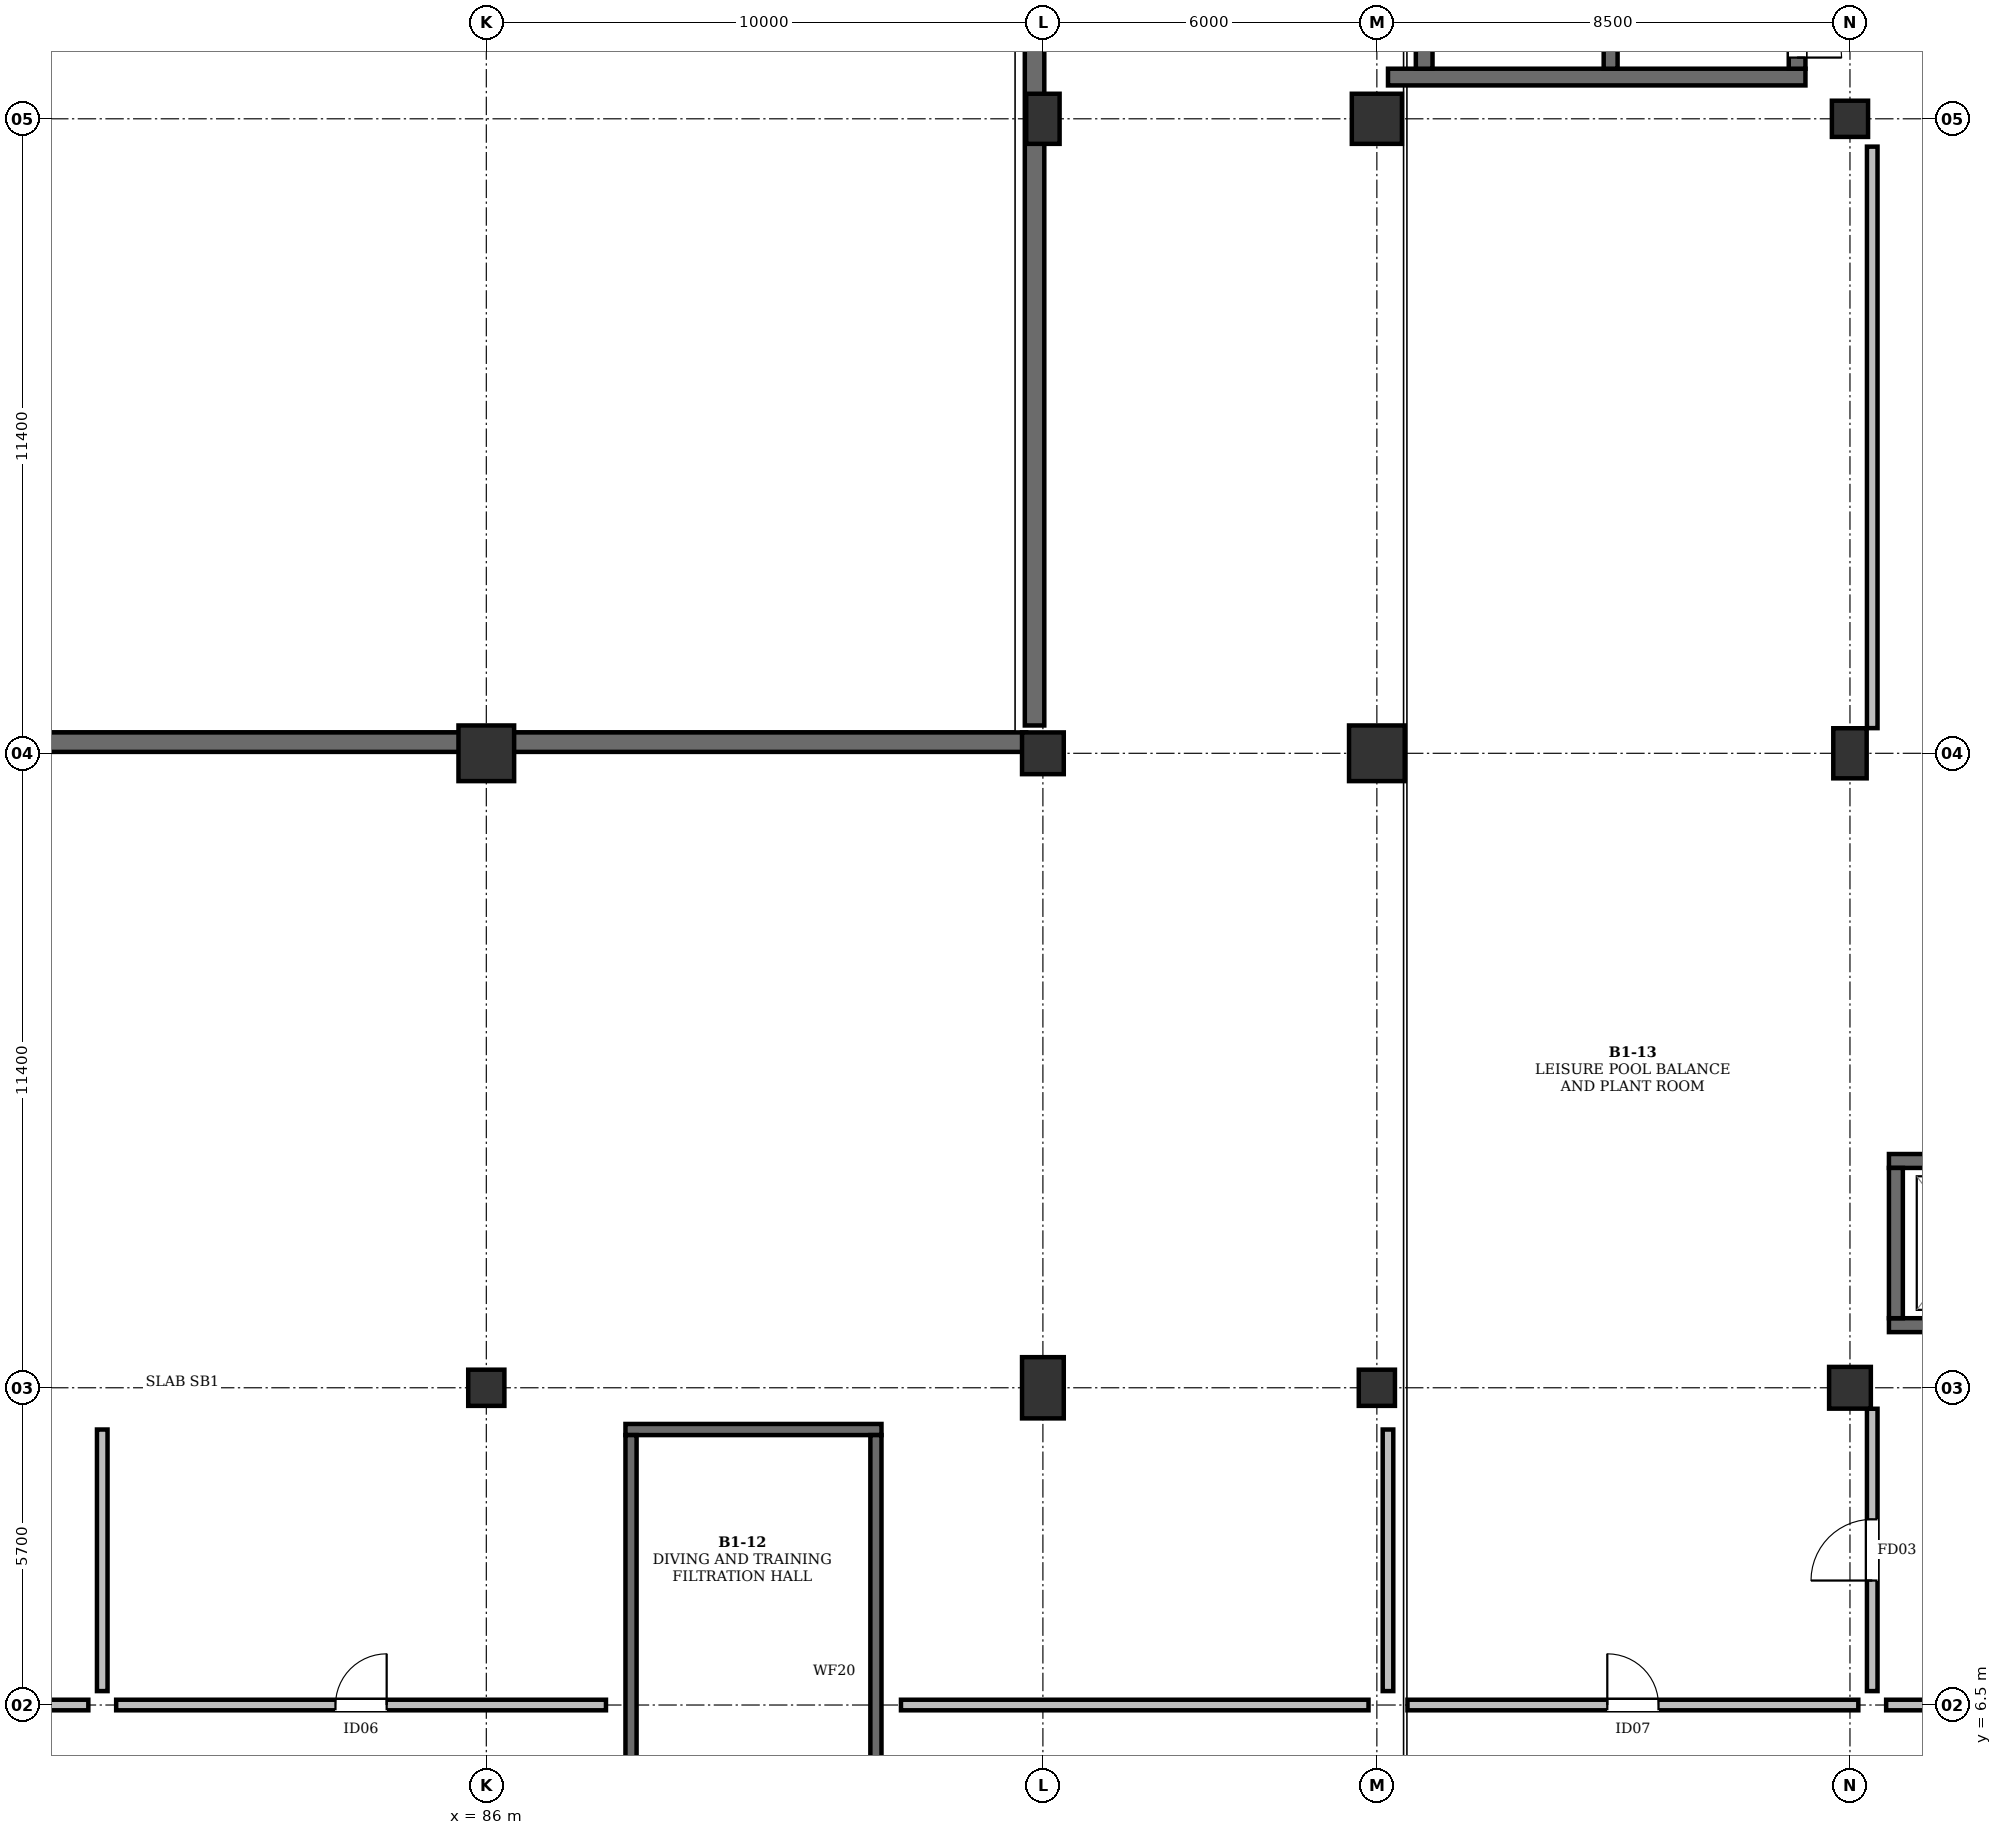
"""IFC4 building model, lengths in metres.
Left out: names, types, materials, properties, quantities, classifications, styles, units other than length and angle.
Written with IfcOpenShell. Run it as: python <this file> out.ifc"""

import sys

from ifc_helpers import new_model, si_unit, direction, frame, frame_2d, origin, origin_2d, place, context, subcontext, project, spatial, rectangle, extrude, element, fill, save


model = new_model("IFC4")
c1 = context("Model", 3, precision=1e-05, world=origin(), true_north=direction((0.0, 1.0)))
c2 = subcontext(c1, "Body", "Model", "MODEL_VIEW")
j1 = project(units=[si_unit("LENGTHUNIT", "METRE"), si_unit("PLANEANGLEUNIT", "RADIAN")], contexts=[c1])
p1 = place(None, origin())
s1 = spatial("IfcSite", under=j1, at=p1, CompositionType="ELEMENT")
p2 = place(p1, origin())
s2 = spatial("IfcBuilding", under=s1, at=p2, CompositionType="ELEMENT")
p3 = place(p2, frame((0.0, 0.0, -4.8)))
s3 = spatial("IfcBuildingStorey", under=s2, at=p3, CompositionType="ELEMENT", Elevation=-4.8)
p4 = place(p3, frame((86.0, 12.2, 0.0), z_axis=(0.0, 0.0, 1.0), x_axis=(1.0, 0.0, 0.0)))
e1 = element("IfcColumn", 1, at=p4, inside=s3, PredefinedType="COLUMN", context=c2, shape_type="SweptSolid", body=[
    extrude(rectangle(XDim=0.65, YDim=0.65, at=origin_2d()), origin(), (0.0, 0.0, 1.0), 4.8),
])
p5 = place(p3, frame((86.0, 23.6, 0.0), z_axis=(0.0, 0.0, 1.0), x_axis=(1.0, 0.0, 0.0)))
e2 = element("IfcColumn", 2, at=p5, inside=s3, PredefinedType="COLUMN", context=c2, shape_type="SweptSolid", body=[
    extrude(rectangle(XDim=1.0, YDim=1.0, at=origin_2d()), origin(), (0.0, 0.0, 1.0), 4.8),
])
p6 = place(p3, frame((96.0, 12.2, 0.0), z_axis=(0.0, 0.0, 1.0), x_axis=(1.0, 0.0, 0.0)))
e3 = element("IfcColumn", 3, at=p6, inside=s3, PredefinedType="COLUMN", context=c2, shape_type="SweptSolid", body=[
    extrude(rectangle(XDim=0.75, YDim=1.1, at=origin_2d()), origin(), (0.0, 0.0, 1.0), 4.8),
])
p7 = place(p3, frame((96.0, 23.6, 0.0), z_axis=(0.0, 0.0, 1.0), x_axis=(1.0, 0.0, 0.0)))
e4 = element("IfcColumn", 4, at=p7, inside=s3, PredefinedType="COLUMN", context=c2, shape_type="SweptSolid", body=[
    extrude(rectangle(XDim=0.75, YDim=0.75, at=origin_2d()), origin(), (0.0, 0.0, 1.0), 4.8),
])
p8 = place(p3, frame((96.0, 35.0, 0.0), z_axis=(0.0, 0.0, 1.0), x_axis=(1.0, 0.0, 0.0)))
e5 = element("IfcColumn", 5, at=p8, inside=s3, PredefinedType="COLUMN", context=c2, shape_type="SweptSolid", body=[
    extrude(rectangle(XDim=0.6, YDim=0.9, at=origin_2d()), origin(), (0.0, 0.0, 1.0), 4.8),
])
p9 = place(p3, frame((102.0, 12.2, 0.0), z_axis=(0.0, 0.0, 1.0), x_axis=(1.0, 0.0, 0.0)))
e6 = element("IfcColumn", 6, at=p9, inside=s3, PredefinedType="COLUMN", context=c2, shape_type="SweptSolid", body=[
    extrude(rectangle(XDim=0.65, YDim=0.65, at=origin_2d()), origin(), (0.0, 0.0, 1.0), 4.8),
])
p10 = place(p3, frame((102.0, 23.6, 0.0), z_axis=(0.0, 0.0, 1.0), x_axis=(1.0, 0.0, 0.0)))
e7 = element("IfcColumn", 7, at=p10, inside=s3, PredefinedType="COLUMN", context=c2, shape_type="SweptSolid", body=[
    extrude(rectangle(XDim=1.0, YDim=1.0, at=origin_2d()), origin(), (0.0, 0.0, 1.0), 4.8),
])
p11 = place(p3, frame((102.0, 35.0, 0.0), z_axis=(0.0, 0.0, 1.0), x_axis=(1.0, 0.0, 0.0)))
e8 = element("IfcColumn", 8, at=p11, inside=s3, PredefinedType="COLUMN", context=c2, shape_type="SweptSolid", body=[
    extrude(rectangle(XDim=0.9, YDim=0.9, at=origin_2d()), origin(), (0.0, 0.0, 1.0), 4.8),
])
p12 = place(p3, frame((110.5, 12.2, 0.0), z_axis=(0.0, 0.0, 1.0), x_axis=(1.0, 0.0, 0.0)))
e9 = element("IfcColumn", 9, at=p12, inside=s3, PredefinedType="COLUMN", context=c2, shape_type="SweptSolid", body=[
    extrude(rectangle(XDim=0.75, YDim=0.75, at=origin_2d()), origin(), (0.0, 0.0, 1.0), 4.8),
])
p13 = place(p3, frame((110.5, 23.6, 0.0), z_axis=(0.0, 0.0, 1.0), x_axis=(1.0, 0.0, 0.0)))
e10 = element("IfcColumn", 10, at=p13, inside=s3, PredefinedType="COLUMN", context=c2, shape_type="SweptSolid", body=[
    extrude(rectangle(XDim=0.6, YDim=0.9, at=origin_2d()), origin(), (0.0, 0.0, 1.0), 4.8),
])
p14 = place(p3, frame((110.5, 35.0, 0.0), z_axis=(0.0, 0.0, 1.0), x_axis=(1.0, 0.0, 0.0)))
e11 = element("IfcColumn", 11, at=p14, inside=s3, PredefinedType="COLUMN", context=c2, shape_type="SweptSolid", body=[
    extrude(rectangle(XDim=0.65, YDim=0.65, at=origin_2d()), origin(), (0.0, 0.0, 1.0), 4.8),
])
p15 = place(p3, frame((46.3, 23.8, 0.0), z_axis=(0.0, 0.0, 1.0), x_axis=(1.0, 0.0, 0.0)))
e12 = element("IfcWall", 12, at=p15, inside=s3, PredefinedType="SHEAR", context=c2, shape_type="SweptSolid", body=[
    extrude(rectangle(XDim=49.4, YDim=0.35, at=frame_2d((24.7, 0.0))), origin(), (0.0, 0.0, 1.0), 4.52),
])
p16 = place(p3, frame((95.85, 24.1, 0.0), z_axis=(0.0, 0.0, 1.0), x_axis=(0.0, 1.0, 0.0)))
e13 = element("IfcWall", 13, at=p16, inside=s3, PredefinedType="SHEAR", context=c2, shape_type="SweptSolid", body=[
    extrude(rectangle(XDim=67.7, YDim=0.35, at=frame_2d((33.85, 0.0))), origin(), (0.0, 0.0, 1.0), 4.52),
])
p17 = place(p3, frame((102.2, 35.75, 0.0), z_axis=(0.0, 0.0, 1.0), x_axis=(1.0, 0.0, 0.0)))
e14 = element("IfcWall", 14, at=p17, inside=s3, PredefinedType="SHEAR", context=c2, shape_type="SweptSolid", body=[
    extrude(rectangle(XDim=7.5, YDim=0.3, at=frame_2d((3.75, 0.0))), origin(), (0.0, 0.0, 1.0), 4.52),
])
p18 = place(p3, frame((102.85, 35.9, 0.0), z_axis=(0.0, 0.0, 1.0), x_axis=(0.0, 1.0, 0.0)))
e15 = element("IfcWall", 15, at=p18, inside=s3, PredefinedType="SHEAR", context=c2, shape_type="SweptSolid", body=[
    extrude(rectangle(XDim=9.6, YDim=0.3, at=frame_2d((4.8, 0.0))), origin(), (0.0, 0.0, 1.0), 4.52),
])
p19 = place(p18, frame((3.6, 0.0, 0.0)))
e16 = element("IfcOpeningElement", 16, at=p19, cuts=e15, PredefinedType="OPENING", context=c2, shape_type="SweptSolid", body=[
    extrude(rectangle(XDim=1.1, YDim=2.2, at=frame_2d((0.55, 1.1))), frame((0.0, 0.162, 0.0), z_axis=(0.0, -1.0, 0.0), x_axis=(1.0, 0.0, 0.0)), (0.0, 0.0, 1.0), 0.324),
])
p20 = place(p3, frame((109.55, 35.9, 0.0), z_axis=(0.0, 0.0, 1.0), x_axis=(0.0, 1.0, 0.0)))
e17 = element("IfcWall", 17, at=p20, inside=s3, PredefinedType="SHEAR", context=c2, shape_type="SweptSolid", body=[
    extrude(rectangle(XDim=9.6, YDim=0.3, at=frame_2d((4.8, 0.0))), origin(), (0.0, 0.0, 1.0), 4.52),
])
p21 = place(p20, frame((0.2, 0.0, 0.0)))
e18 = element("IfcOpeningElement", 18, at=p21, cuts=e17, PredefinedType="OPENING", context=c2, shape_type="SweptSolid", body=[
    extrude(rectangle(XDim=1.6, YDim=2.2, at=frame_2d((0.8, 1.1))), frame((0.0, 0.162, 0.0), z_axis=(0.0, -1.0, 0.0), x_axis=(1.0, 0.0, 0.0)), (0.0, 0.0, 1.0), 0.324),
])
p22 = place(p3, frame((106.2, 35.9, 0.0), z_axis=(0.0, 0.0, 1.0), x_axis=(0.0, 1.0, 0.0)))
e19 = element("IfcWall", 19, at=p22, inside=s3, PredefinedType="SHEAR", context=c2, shape_type="SweptSolid", body=[
    extrude(rectangle(XDim=9.6, YDim=0.25, at=frame_2d((4.8, 0.0))), origin(), (0.0, 0.0, 1.0), 4.52),
])
for number, where, z_axis, x_axis in (
    (20, (111.2, 13.325, 0.0), (0.0, 0.0, 1.0), (1.0, 0.0, 0.0)),
    (21, (111.2, 16.275, 0.0), (0.0, 0.0, 1.0), (1.0, 0.0, 0.0)),
):
    element("IfcWall", number, at=place(p3, frame(where, z_axis=z_axis, x_axis=x_axis)), inside=s3, PredefinedType="SHEAR", context=c2, shape_type="SweptSolid", body=[
        extrude(rectangle(XDim=2.8, YDim=0.25, at=frame_2d((1.4, 0.0))), origin(), (0.0, 0.0, 1.0), 4.52),
    ])
p23 = place(p3, frame((111.325, 13.45, 0.0), z_axis=(0.0, 0.0, 1.0), x_axis=(0.0, 1.0, 0.0)))
e22 = element("IfcWall", 22, at=p23, inside=s3, PredefinedType="SHEAR", context=c2, shape_type="SweptSolid", body=[
    extrude(rectangle(XDim=2.7, YDim=0.25, at=frame_2d((1.35, 0.0))), origin(), (0.0, 0.0, 1.0), 4.52),
])
p24 = place(p3, frame((88.5, 11.45, 0.0), z_axis=(0.0, 0.0, 1.0), x_axis=(1.0, 0.0, 0.0)))
e23 = element("IfcWall", 23, at=p24, inside=s3, PredefinedType="SOLIDWALL", context=c2, shape_type="SweptSolid", body=[
    extrude(rectangle(XDim=4.6, YDim=0.2, at=frame_2d((2.3, 0.0))), origin(), (0.0, 0.0, 1.0), 4.52),
])
for number, where, z_axis, x_axis in (
    (24, (88.6, 2.85, 0.0), (0.0, 0.0, 1.0), (0.0, 1.0, 0.0)),
    (25, (93.0, 2.85, 0.0), (0.0, 0.0, 1.0), (0.0, 1.0, 0.0)),
):
    element("IfcWall", number, at=place(p3, frame(where, z_axis=z_axis, x_axis=x_axis)), inside=s3, PredefinedType="SOLIDWALL", context=c2, shape_type="SweptSolid", body=[
        extrude(rectangle(XDim=8.5, YDim=0.2, at=frame_2d((4.25, 0.0))), origin(), (0.0, 0.0, 1.0), 4.52),
    ])
p25 = place(p3, frame((55.35, 6.5, 0.0), z_axis=(0.0, 0.0, 1.0), x_axis=(1.0, 0.0, 0.0)))
e26 = element("IfcWall", 26, at=p25, inside=s3, PredefinedType="SOLIDWALL", context=c2, shape_type="SweptSolid", body=[
    extrude(rectangle(XDim=23.5, YDim=0.19, at=frame_2d((11.75, 0.0))), origin(), (0.0, 0.0, 1.0), 3.605),
])
p26 = place(p25, frame((11.275, 0.0, 0.0)))
e27 = element("IfcOpeningElement", 27, at=p26, cuts=e26, PredefinedType="OPENING", context=c2, shape_type="SweptSolid", body=[
    extrude(rectangle(XDim=0.95, YDim=2.15, at=frame_2d((0.475, 1.075))), frame((0.0, 0.107, 0.0), z_axis=(0.0, -1.0, 0.0), x_axis=(1.0, 0.0, 0.0)), (0.0, 0.0, 1.0), 0.214),
])
p27 = place(p3, frame((79.35, 6.5, 0.0), z_axis=(0.0, 0.0, 1.0), x_axis=(1.0, 0.0, 0.0)))
e28 = element("IfcWall", 28, at=p27, inside=s3, PredefinedType="SOLIDWALL", context=c2, shape_type="SweptSolid", body=[
    extrude(rectangle(XDim=8.8, YDim=0.19, at=frame_2d((4.4, 0.0))), origin(), (0.0, 0.0, 1.0), 3.605),
])
p28 = place(p27, frame((3.94, 0.0, 0.0)))
e29 = element("IfcOpeningElement", 29, at=p28, cuts=e28, PredefinedType="OPENING", context=c2, shape_type="SweptSolid", body=[
    extrude(rectangle(XDim=0.92, YDim=2.1, at=frame_2d((0.46, 1.05))), frame((0.0, 0.107, 0.0), z_axis=(0.0, -1.0, 0.0), x_axis=(1.0, 0.0, 0.0)), (0.0, 0.0, 1.0), 0.214),
])
p29 = place(p3, frame((93.45, 6.5, 0.0), z_axis=(0.0, 0.0, 1.0), x_axis=(1.0, 0.0, 0.0)))
e30 = element("IfcWall", 30, at=p29, inside=s3, PredefinedType="SOLIDWALL", context=c2, shape_type="SweptSolid", body=[
    extrude(rectangle(XDim=8.4, YDim=0.19, at=frame_2d((4.2, 0.0))), origin(), (0.0, 0.0, 1.0), 3.605),
])
p30 = place(p3, frame((102.55, 6.5, 0.0), z_axis=(0.0, 0.0, 1.0), x_axis=(1.0, 0.0, 0.0)))
e31 = element("IfcWall", 31, at=p30, inside=s3, PredefinedType="SOLIDWALL", context=c2, shape_type="SweptSolid", body=[
    extrude(rectangle(XDim=8.1, YDim=0.19, at=frame_2d((4.05, 0.0))), origin(), (0.0, 0.0, 1.0), 3.605),
])
p31 = place(p30, frame((3.59, 0.0, 0.0)))
e32 = element("IfcOpeningElement", 32, at=p31, cuts=e31, PredefinedType="OPENING", context=c2, shape_type="SweptSolid", body=[
    extrude(rectangle(XDim=0.92, YDim=2.15, at=frame_2d((0.46, 1.075))), frame((0.0, 0.107, 0.0), z_axis=(0.0, -1.0, 0.0), x_axis=(1.0, 0.0, 0.0)), (0.0, 0.0, 1.0), 0.214),
])
p32 = place(p3, frame((111.15, 6.5, 0.0), z_axis=(0.0, 0.0, 1.0), x_axis=(1.0, 0.0, 0.0)))
e33 = element("IfcWall", 33, at=p32, inside=s3, PredefinedType="SOLIDWALL", context=c2, shape_type="SweptSolid", body=[
    extrude(rectangle(XDim=7.5, YDim=0.19, at=frame_2d((3.75, 0.0))), origin(), (0.0, 0.0, 1.0), 3.605),
])
p33 = place(p32, frame((3.05, 0.0, 0.0)))
e34 = element("IfcOpeningElement", 34, at=p33, cuts=e33, PredefinedType="OPENING", context=c2, shape_type="SweptSolid", body=[
    extrude(rectangle(XDim=1.4, YDim=2.2, at=frame_2d((0.7, 1.1))), frame((0.0, 0.107, 0.0), z_axis=(0.0, -1.0, 0.0), x_axis=(1.0, 0.0, 0.0)), (0.0, 0.0, 1.0), 0.214),
])
p34 = place(p3, frame((79.1, 6.75, 0.0), z_axis=(0.0, 0.0, 1.0), x_axis=(0.0, 1.0, 0.0)))
e35 = element("IfcWall", 35, at=p34, inside=s3, PredefinedType="SOLIDWALL", context=c2, shape_type="SweptSolid", body=[
    extrude(rectangle(XDim=4.7, YDim=0.19, at=frame_2d((2.35, 0.0))), origin(), (0.0, 0.0, 1.0), 4.099),
])
p35 = place(p3, frame((102.2, 6.75, 0.0), z_axis=(0.0, 0.0, 1.0), x_axis=(0.0, 1.0, 0.0)))
e36 = element("IfcWall", 36, at=p35, inside=s3, PredefinedType="SOLIDWALL", context=c2, shape_type="SweptSolid", body=[
    extrude(rectangle(XDim=4.7, YDim=0.19, at=frame_2d((2.35, 0.0))), origin(), (0.0, 0.0, 1.0), 3.605),
])
p36 = place(p3, frame((110.9, 6.75, 0.0), z_axis=(0.0, 0.0, 1.0), x_axis=(0.0, 1.0, 0.0)))
e37 = element("IfcWall", 37, at=p36, inside=s3, PredefinedType="SOLIDWALL", context=c2, shape_type="SweptSolid", body=[
    extrude(rectangle(XDim=5.073, YDim=0.19, at=frame_2d((2.537, 0.0))), origin(), (0.0, 0.0, 1.0), 3.255),
])
p37 = place(p36, frame((1.987, 0.0, 0.0)))
e38 = element("IfcOpeningElement", 38, at=p37, cuts=e37, PredefinedType="OPENING", context=c2, shape_type="SweptSolid", body=[
    extrude(rectangle(XDim=1.1, YDim=2.2, at=frame_2d((0.55, 1.1))), frame((0.0, 0.107, 0.0), z_axis=(0.0, -1.0, 0.0), x_axis=(1.0, 0.0, 0.0)), (0.0, 0.0, 1.0), 0.214),
])
p38 = place(p3, frame((110.9, 24.052, 0.0), z_axis=(0.0, 0.0, 1.0), x_axis=(0.0, 1.0, 0.0)))
e39 = element("IfcWall", 39, at=p38, inside=s3, PredefinedType="SOLIDWALL", context=c2, shape_type="SweptSolid", body=[
    extrude(rectangle(XDim=10.448, YDim=0.19, at=frame_2d((5.224, 0.0))), origin(), (0.0, 0.0, 1.0), 3.255),
])
p39 = place(p21, frame((1.6, 0.0, 0.0), z_axis=(0.0, 0.0, 1.0), x_axis=(-1.0, 0.0, 0.0)))
e40 = element("IfcDoor", 40, at=p39, inside=s3, OperationType="DOUBLE_DOOR_SINGLE_SWING", PredefinedType="DOOR", context=c2, shape_type="SweptSolid", body=[
    extrude(rectangle(XDim=1.6, YDim=2.2, at=frame_2d((0.8, 1.1))), frame((0.0, 0.025, 0.0), z_axis=(0.0, -1.0, 0.0), x_axis=(1.0, 0.0, 0.0)), (0.0, 0.0, 1.0), 0.05),
])
fill(e18, e40)
p40 = place(p28, origin())
e41 = element("IfcDoor", 41, at=p40, inside=s3, OperationType="SINGLE_SWING_RIGHT", PredefinedType="DOOR", context=c2, shape_type="SweptSolid", body=[
    extrude(rectangle(XDim=0.92, YDim=2.1, at=frame_2d((0.46, 1.05))), frame((0.0, 0.025, 0.0), z_axis=(0.0, -1.0, 0.0), x_axis=(1.0, 0.0, 0.0)), (0.0, 0.0, 1.0), 0.05),
])
fill(e29, e41)
p41 = place(p31, origin())
e42 = element("IfcDoor", 42, at=p41, inside=s3, OperationType="SINGLE_SWING_LEFT", PredefinedType="DOOR", context=c2, shape_type="SweptSolid", body=[
    extrude(rectangle(XDim=0.92, YDim=2.15, at=frame_2d((0.46, 1.075))), frame((0.0, 0.025, 0.0), z_axis=(0.0, -1.0, 0.0), x_axis=(1.0, 0.0, 0.0)), (0.0, 0.0, 1.0), 0.05),
])
fill(e32, e42)
p42 = place(p37, origin())
e43 = element("IfcDoor", 43, at=p42, inside=s3, OperationType="SINGLE_SWING_LEFT", PredefinedType="DOOR", context=c2, shape_type="SweptSolid", body=[
    extrude(rectangle(XDim=1.1, YDim=2.2, at=frame_2d((0.55, 1.1))), frame((0.0, 0.025, 0.0), z_axis=(0.0, -1.0, 0.0), x_axis=(1.0, 0.0, 0.0)), (0.0, 0.0, 1.0), 0.05),
])
fill(e38, e43)
save(model, sys.argv[1])
